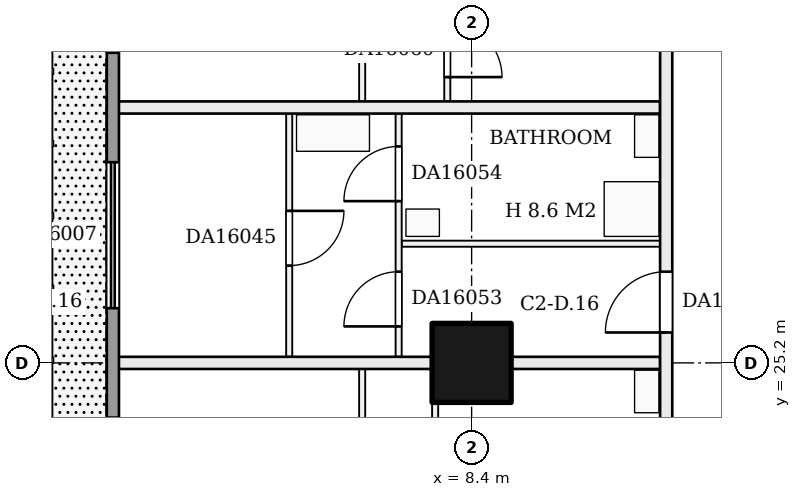
"""IFC4 building model, lengths in metres.
Left out: names, types, materials, properties, quantities, classifications, styles, units other than length and angle.
Written with IfcOpenShell. Run it as: python <this file> out.ifc"""

import sys

from ifc_helpers import new_model, si_unit, direction, frame, frame_2d, origin, origin_2d, place, context, subcontext, project, spatial, rectangle, extrude, element, fill, save


model = new_model("IFC4")
c1 = context("Model", 3, precision=1e-05, world=origin(), true_north=direction((0.0, 1.0)))
c2 = subcontext(c1, "Body", "Model", "MODEL_VIEW")
j1 = project(units=[si_unit("LENGTHUNIT", "METRE"), si_unit("PLANEANGLEUNIT", "RADIAN")], contexts=[c1])
p1 = place(None, origin())
s1 = spatial("IfcSite", under=j1, at=p1, CompositionType="ELEMENT")
p2 = place(p1, origin())
s2 = spatial("IfcBuilding", under=s1, at=p2, CompositionType="ELEMENT")
p3 = place(p2, frame((0.0, 0.0, 67.2)))
s3 = spatial("IfcBuildingStorey", under=s2, at=p3, CompositionType="ELEMENT", Elevation=67.2)
p4 = place(p3, frame((8.4, 25.2, 0.0), z_axis=(0.0, 0.0, 1.0), x_axis=(1.0, 0.0, 0.0)))
e1 = element("IfcColumn", 1, at=p4, inside=s3, PredefinedType="COLUMN", context=c2, shape_type="SweptSolid", body=[
    extrude(rectangle(XDim=1.3, YDim=1.3, at=origin_2d()), origin(), (0.0, 0.0, 1.0), 3.22),
])
p5 = place(p3, frame((2.5, 25.2, 0.0), z_axis=(0.0, 0.0, 1.0), x_axis=(1.0, 0.0, 0.0)))
e2 = element("IfcWall", 2, at=p5, inside=s3, PredefinedType="PARTITIONING", context=c2, shape_type="SweptSolid", body=[
    extrude(rectangle(XDim=9.0, YDim=0.2, at=frame_2d((4.5, 0.0))), origin(), (0.0, 0.0, 1.0), 3.22),
])
p6 = place(p3, frame((7.25, 27.16, 0.0), z_axis=(0.0, 0.0, 1.0), x_axis=(1.0, 0.0, 0.0)))
e3 = element("IfcWall", 3, at=p6, inside=s3, PredefinedType="PARTITIONING", context=c2, shape_type="SweptSolid", body=[
    extrude(rectangle(XDim=4.25, YDim=0.1, at=frame_2d((2.125, 0.0))), origin(), (0.0, 0.0, 1.0), 3.22),
])
p7 = place(p3, frame((2.5, 29.4, 0.0), z_axis=(0.0, 0.0, 1.0), x_axis=(1.0, 0.0, 0.0)))
e4 = element("IfcWall", 4, at=p7, inside=s3, PredefinedType="PARTITIONING", context=c2, shape_type="SweptSolid", body=[
    extrude(rectangle(XDim=9.0, YDim=0.2, at=frame_2d((4.5, 0.0))), origin(), (0.0, 0.0, 1.0), 3.22),
])
p8 = place(p3, frame((5.4, 25.3, 0.0), z_axis=(0.0, 0.0, 1.0), x_axis=(0.0, 1.0, 0.0)))
e5 = element("IfcWall", 5, at=p8, inside=s3, PredefinedType="PARTITIONING", context=c2, shape_type="SweptSolid", body=[
    extrude(rectangle(XDim=4.0, YDim=0.1, at=frame_2d((2.0, 0.0))), origin(), (0.0, 0.0, 1.0), 3.22),
])
p9 = place(p8, frame((1.5, 0.0, 0.0)))
e6 = element("IfcOpeningElement", 6, at=p9, cuts=e5, PredefinedType="OPENING", context=c2, shape_type="SweptSolid", body=[
    extrude(rectangle(XDim=0.9, YDim=2.1, at=frame_2d((0.45, 1.05))), frame((0.0, 0.06, 0.0), z_axis=(0.0, -1.0, 0.0), x_axis=(1.0, 0.0, 0.0)), (0.0, 0.0, 1.0), 0.12),
])
p10 = place(p3, frame((6.6, 12.7, 0.0), z_axis=(0.0, 0.0, 1.0), x_axis=(0.0, 1.0, 0.0)))
e7 = element("IfcWall", 7, at=p10, inside=s3, PredefinedType="PARTITIONING", context=c2, shape_type="SweptSolid", body=[
    extrude(rectangle(XDim=12.4, YDim=0.1, at=frame_2d((6.2, 0.0))), origin(), (0.0, 0.0, 1.0), 3.22),
])
p11 = place(p10, frame((1.6, 0.0, 0.0)))
e8 = element("IfcOpeningElement", 8, at=p11, cuts=e7, PredefinedType="OPENING", context=c2, shape_type="SweptSolid", body=[
    extrude(rectangle(XDim=0.9, YDim=2.1, at=frame_2d((0.45, 1.05))), frame((0.0, 0.06, 0.0), z_axis=(0.0, -1.0, 0.0), x_axis=(1.0, 0.0, 0.0)), (0.0, 0.0, 1.0), 0.12),
])
p12 = place(p10, frame((7.8, 0.0, 0.0)))
e9 = element("IfcOpeningElement", 9, at=p12, cuts=e7, PredefinedType="OPENING", context=c2, shape_type="SweptSolid", body=[
    extrude(rectangle(XDim=0.9, YDim=2.1, at=frame_2d((0.45, 1.05))), frame((0.0, 0.06, 0.0), z_axis=(0.0, -1.0, 0.0), x_axis=(1.0, 0.0, 0.0)), (0.0, 0.0, 1.0), 0.12),
])
p13 = place(p3, frame((6.6, 29.5, 0.0), z_axis=(0.0, 0.0, 1.0), x_axis=(0.0, 1.0, 0.0)))
e10 = element("IfcWall", 10, at=p13, inside=s3, PredefinedType="PARTITIONING", context=c2, shape_type="SweptSolid", body=[
    extrude(rectangle(XDim=12.4, YDim=0.1, at=frame_2d((6.2, 0.0))), origin(), (0.0, 0.0, 1.0), 3.22),
])
p14 = place(p13, frame((1.5, 0.0, 0.0)))
e11 = element("IfcOpeningElement", 11, at=p14, cuts=e10, PredefinedType="OPENING", context=c2, shape_type="SweptSolid", body=[
    extrude(rectangle(XDim=0.9, YDim=2.1, at=frame_2d((0.45, 1.05))), frame((0.0, 0.06, 0.0), z_axis=(0.0, -1.0, 0.0), x_axis=(1.0, 0.0, 0.0)), (0.0, 0.0, 1.0), 0.12),
])
p15 = place(p13, frame((5.7, 0.0, 0.0)))
e12 = element("IfcOpeningElement", 12, at=p15, cuts=e10, PredefinedType="OPENING", context=c2, shape_type="SweptSolid", body=[
    extrude(rectangle(XDim=0.9, YDim=2.1, at=frame_2d((0.45, 1.05))), frame((0.0, 0.06, 0.0), z_axis=(0.0, -1.0, 0.0), x_axis=(1.0, 0.0, 0.0)), (0.0, 0.0, 1.0), 0.12),
])
p16 = place(p13, frame((9.9, 0.0, 0.0)))
e13 = element("IfcOpeningElement", 13, at=p16, cuts=e10, PredefinedType="OPENING", context=c2, shape_type="SweptSolid", body=[
    extrude(rectangle(XDim=0.9, YDim=2.1, at=frame_2d((0.45, 1.05))), frame((0.0, 0.06, 0.0), z_axis=(0.0, -1.0, 0.0), x_axis=(1.0, 0.0, 0.0)), (0.0, 0.0, 1.0), 0.12),
])
p17 = place(p3, frame((7.2, 25.3, 0.0), z_axis=(0.0, 0.0, 1.0), x_axis=(0.0, 1.0, 0.0)))
e14 = element("IfcWall", 14, at=p17, inside=s3, PredefinedType="PARTITIONING", context=c2, shape_type="SweptSolid", body=[
    extrude(rectangle(XDim=4.0, YDim=0.1, at=frame_2d((2.0, 0.0))), origin(), (0.0, 0.0, 1.0), 3.22),
])
p18 = place(p17, frame((0.5, 0.0, 0.0)))
e15 = element("IfcOpeningElement", 15, at=p18, cuts=e14, PredefinedType="OPENING", context=c2, shape_type="SweptSolid", body=[
    extrude(rectangle(XDim=0.9, YDim=2.1, at=frame_2d((0.45, 1.05))), frame((0.0, 0.06, 0.0), z_axis=(0.0, -1.0, 0.0), x_axis=(1.0, 0.0, 0.0)), (0.0, 0.0, 1.0), 0.12),
])
p19 = place(p17, frame((2.56, 0.0, 0.0)))
e16 = element("IfcOpeningElement", 16, at=p19, cuts=e14, PredefinedType="OPENING", context=c2, shape_type="SweptSolid", body=[
    extrude(rectangle(XDim=0.9, YDim=2.1, at=frame_2d((0.45, 1.05))), frame((0.0, 0.06, 0.0), z_axis=(0.0, -1.0, 0.0), x_axis=(1.0, 0.0, 0.0)), (0.0, 0.0, 1.0), 0.12),
])
p20 = place(p3, frame((7.8, 12.7, 0.0), z_axis=(0.0, 0.0, 1.0), x_axis=(0.0, 1.0, 0.0)))
e17 = element("IfcWall", 17, at=p20, inside=s3, PredefinedType="PARTITIONING", context=c2, shape_type="SweptSolid", body=[
    extrude(rectangle(XDim=12.4, YDim=0.1, at=frame_2d((6.2, 0.0))), origin(), (0.0, 0.0, 1.0), 3.22),
])
p21 = place(p20, frame((7.0, 0.0, 0.0)))
e18 = element("IfcOpeningElement", 18, at=p21, cuts=e17, PredefinedType="OPENING", context=c2, shape_type="SweptSolid", body=[
    extrude(rectangle(XDim=0.9, YDim=2.1, at=frame_2d((0.45, 1.05))), frame((0.0, 0.06, 0.0), z_axis=(0.0, -1.0, 0.0), x_axis=(1.0, 0.0, 0.0)), (0.0, 0.0, 1.0), 0.12),
])
p22 = place(p20, frame((0.4, 0.0, 0.0)))
e19 = element("IfcOpeningElement", 19, at=p22, cuts=e17, PredefinedType="OPENING", context=c2, shape_type="SweptSolid", body=[
    extrude(rectangle(XDim=0.9, YDim=2.1, at=frame_2d((0.45, 1.05))), frame((0.0, 0.06, 0.0), z_axis=(0.0, -1.0, 0.0), x_axis=(1.0, 0.0, 0.0)), (0.0, 0.0, 1.0), 0.12),
])
p23 = place(p20, frame((2.35, 0.0, 0.0)))
e20 = element("IfcOpeningElement", 20, at=p23, cuts=e17, PredefinedType="OPENING", context=c2, shape_type="SweptSolid", body=[
    extrude(rectangle(XDim=0.9, YDim=2.1, at=frame_2d((0.45, 1.05))), frame((0.0, 0.06, 0.0), z_axis=(0.0, -1.0, 0.0), x_axis=(1.0, 0.0, 0.0)), (0.0, 0.0, 1.0), 0.12),
])
p24 = place(p20, frame((10.35, 0.0, 0.0)))
e21 = element("IfcOpeningElement", 21, at=p24, cuts=e17, PredefinedType="OPENING", context=c2, shape_type="SweptSolid", body=[
    extrude(rectangle(XDim=0.9, YDim=2.1, at=frame_2d((0.45, 1.05))), frame((0.0, 0.06, 0.0), z_axis=(0.0, -1.0, 0.0), x_axis=(1.0, 0.0, 0.0)), (0.0, 0.0, 1.0), 0.12),
])
p25 = place(p3, frame((8.0, 29.5, 0.0), z_axis=(0.0, 0.0, 1.0), x_axis=(0.0, 1.0, 0.0)))
e22 = element("IfcWall", 22, at=p25, inside=s3, PredefinedType="PARTITIONING", context=c2, shape_type="SweptSolid", body=[
    extrude(rectangle(XDim=12.4, YDim=0.1, at=frame_2d((6.2, 0.0))), origin(), (0.0, 0.0, 1.0), 3.22),
])
p26 = place(p25, frame((5.12, 0.0, 0.0)))
e23 = element("IfcOpeningElement", 23, at=p26, cuts=e22, PredefinedType="OPENING", context=c2, shape_type="SweptSolid", body=[
    extrude(rectangle(XDim=0.9, YDim=2.1, at=frame_2d((0.45, 1.05))), frame((0.0, 0.06, 0.0), z_axis=(0.0, -1.0, 0.0), x_axis=(1.0, 0.0, 0.0)), (0.0, 0.0, 1.0), 0.12),
])
p27 = place(p25, frame((0.4, 0.0, 0.0)))
e24 = element("IfcOpeningElement", 24, at=p27, cuts=e22, PredefinedType="OPENING", context=c2, shape_type="SweptSolid", body=[
    extrude(rectangle(XDim=0.9, YDim=2.1, at=frame_2d((0.45, 1.05))), frame((0.0, 0.06, 0.0), z_axis=(0.0, -1.0, 0.0), x_axis=(1.0, 0.0, 0.0)), (0.0, 0.0, 1.0), 0.12),
])
p28 = place(p25, frame((2.36, 0.0, 0.0)))
e25 = element("IfcOpeningElement", 25, at=p28, cuts=e22, PredefinedType="OPENING", context=c2, shape_type="SweptSolid", body=[
    extrude(rectangle(XDim=0.9, YDim=2.1, at=frame_2d((0.45, 1.05))), frame((0.0, 0.06, 0.0), z_axis=(0.0, -1.0, 0.0), x_axis=(1.0, 0.0, 0.0)), (0.0, 0.0, 1.0), 0.12),
])
p29 = place(p25, frame((7.58, 0.0, 0.0)))
e26 = element("IfcOpeningElement", 26, at=p29, cuts=e22, PredefinedType="OPENING", context=c2, shape_type="SweptSolid", body=[
    extrude(rectangle(XDim=0.9, YDim=2.1, at=frame_2d((0.45, 1.05))), frame((0.0, 0.06, 0.0), z_axis=(0.0, -1.0, 0.0), x_axis=(1.0, 0.0, 0.0)), (0.0, 0.0, 1.0), 0.12),
])
p30 = place(p25, frame((10.44, 0.0, 0.0)))
e27 = element("IfcOpeningElement", 27, at=p30, cuts=e22, PredefinedType="OPENING", context=c2, shape_type="SweptSolid", body=[
    extrude(rectangle(XDim=0.9, YDim=2.1, at=frame_2d((0.45, 1.05))), frame((0.0, 0.06, 0.0), z_axis=(0.0, -1.0, 0.0), x_axis=(1.0, 0.0, 0.0)), (0.0, 0.0, 1.0), 0.12),
])
p31 = place(p3, frame((11.6, 11.7, 0.0), z_axis=(0.0, 0.0, 1.0), x_axis=(0.0, 1.0, 0.0)))
e28 = element("IfcWall", 28, at=p31, inside=s3, PredefinedType="PARTITIONING", context=c2, shape_type="SweptSolid", body=[
    extrude(rectangle(XDim=30.3, YDim=0.2, at=frame_2d((15.15, 0.0))), origin(), (0.0, 0.0, 1.0), 3.22),
])
p32 = place(p31, frame((7.9, 0.0, 0.0)))
e29 = element("IfcOpeningElement", 29, at=p32, cuts=e28, PredefinedType="OPENING", context=c2, shape_type="SweptSolid", body=[
    extrude(rectangle(XDim=1.0, YDim=2.1, at=frame_2d((0.5, 1.05))), frame((0.0, 0.11, 0.0), z_axis=(0.0, -1.0, 0.0), x_axis=(1.0, 0.0, 0.0)), (0.0, 0.0, 1.0), 0.22),
])
p33 = place(p31, frame((14.0, 0.0, 0.0)))
e30 = element("IfcOpeningElement", 30, at=p33, cuts=e28, PredefinedType="OPENING", context=c2, shape_type="SweptSolid", body=[
    extrude(rectangle(XDim=1.0, YDim=2.1, at=frame_2d((0.5, 1.05))), frame((0.0, 0.11, 0.0), z_axis=(0.0, -1.0, 0.0), x_axis=(1.0, 0.0, 0.0)), (0.0, 0.0, 1.0), 0.22),
])
p34 = place(p31, frame((22.92, 0.0, 0.0)))
e31 = element("IfcOpeningElement", 31, at=p34, cuts=e28, PredefinedType="OPENING", context=c2, shape_type="SweptSolid", body=[
    extrude(rectangle(XDim=1.0, YDim=2.1, at=frame_2d((0.5, 1.05))), frame((0.0, 0.11, 0.0), z_axis=(0.0, -1.0, 0.0), x_axis=(1.0, 0.0, 0.0)), (0.0, 0.0, 1.0), 0.22),
])
p35 = place(p3, frame((2.5, 53.8, 0.0), z_axis=(0.0, 0.0, 1.0), x_axis=(0.0, -1.0, 0.0)))
e32 = element("IfcWall", 32, at=p35, inside=s3, PredefinedType="SOLIDWALL", context=c2, shape_type="SweptSolid", body=[
    extrude(rectangle(XDim=48.8, YDim=0.2, at=frame_2d((24.4, 0.0))), origin(), (0.0, 0.0, 1.0), 3.22),
])
p36 = place(p35, frame((46.1, 0.0, 0.0)))
e33 = element("IfcOpeningElement", 33, at=p36, cuts=e32, PredefinedType="OPENING", context=c2, shape_type="SweptSolid", body=[
    extrude(rectangle(XDim=2.4, YDim=2.2, at=frame_2d((1.2, 1.1))), frame((0.0, 0.11, 0.0), z_axis=(0.0, -1.0, 0.0), x_axis=(1.0, 0.0, 0.0)), (0.0, 0.0, 1.0), 0.22),
])
p37 = place(p35, frame((42.1, 0.0, 0.0)))
e34 = element("IfcOpeningElement", 34, at=p37, cuts=e32, PredefinedType="OPENING", context=c2, shape_type="SweptSolid", body=[
    extrude(rectangle(XDim=2.4, YDim=2.2, at=frame_2d((1.2, 1.1))), frame((0.0, 0.11, 0.0), z_axis=(0.0, -1.0, 0.0), x_axis=(1.0, 0.0, 0.0)), (0.0, 0.0, 1.0), 0.22),
])
p38 = place(p35, frame((37.9, 0.0, 0.9)))
e35 = element("IfcOpeningElement", 35, at=p38, cuts=e32, PredefinedType="OPENING", context=c2, shape_type="SweptSolid", body=[
    extrude(rectangle(XDim=2.4, YDim=1.5, at=frame_2d((1.2, 0.75))), frame((0.0, 0.11, 0.0), z_axis=(0.0, -1.0, 0.0), x_axis=(1.0, 0.0, 0.0)), (0.0, 0.0, 1.0), 0.22),
])
p39 = place(p35, frame((33.7, 0.0, 0.0)))
e36 = element("IfcOpeningElement", 36, at=p39, cuts=e32, PredefinedType="OPENING", context=c2, shape_type="SweptSolid", body=[
    extrude(rectangle(XDim=2.4, YDim=2.2, at=frame_2d((1.2, 1.1))), frame((0.0, 0.11, 0.0), z_axis=(0.0, -1.0, 0.0), x_axis=(1.0, 0.0, 0.0)), (0.0, 0.0, 1.0), 0.22),
])
p40 = place(p35, frame((29.5, 0.0, 0.0)))
e37 = element("IfcOpeningElement", 37, at=p40, cuts=e32, PredefinedType="OPENING", context=c2, shape_type="SweptSolid", body=[
    extrude(rectangle(XDim=2.4, YDim=2.2, at=frame_2d((1.2, 1.1))), frame((0.0, 0.11, 0.0), z_axis=(0.0, -1.0, 0.0), x_axis=(1.0, 0.0, 0.0)), (0.0, 0.0, 1.0), 0.22),
])
p41 = place(p35, frame((25.3, 0.0, 0.0)))
e38 = element("IfcOpeningElement", 38, at=p41, cuts=e32, PredefinedType="OPENING", context=c2, shape_type="SweptSolid", body=[
    extrude(rectangle(XDim=2.4, YDim=2.2, at=frame_2d((1.2, 1.1))), frame((0.0, 0.11, 0.0), z_axis=(0.0, -1.0, 0.0), x_axis=(1.0, 0.0, 0.0)), (0.0, 0.0, 1.0), 0.22),
])
p42 = place(p35, frame((21.1, 0.0, 0.9)))
e39 = element("IfcOpeningElement", 39, at=p42, cuts=e32, PredefinedType="OPENING", context=c2, shape_type="SweptSolid", body=[
    extrude(rectangle(XDim=2.4, YDim=1.5, at=frame_2d((1.2, 0.75))), frame((0.0, 0.11, 0.0), z_axis=(0.0, -1.0, 0.0), x_axis=(1.0, 0.0, 0.0)), (0.0, 0.0, 1.0), 0.22),
])
p43 = place(p35, frame((16.9, 0.0, 0.0)))
e40 = element("IfcOpeningElement", 40, at=p43, cuts=e32, PredefinedType="OPENING", context=c2, shape_type="SweptSolid", body=[
    extrude(rectangle(XDim=2.4, YDim=2.2, at=frame_2d((1.2, 1.1))), frame((0.0, 0.11, 0.0), z_axis=(0.0, -1.0, 0.0), x_axis=(1.0, 0.0, 0.0)), (0.0, 0.0, 1.0), 0.22),
])
p44 = place(p35, frame((12.7, 0.0, 0.9)))
e41 = element("IfcOpeningElement", 41, at=p44, cuts=e32, PredefinedType="OPENING", context=c2, shape_type="SweptSolid", body=[
    extrude(rectangle(XDim=2.4, YDim=1.5, at=frame_2d((1.2, 0.75))), frame((0.0, 0.11, 0.0), z_axis=(0.0, -1.0, 0.0), x_axis=(1.0, 0.0, 0.0)), (0.0, 0.0, 1.0), 0.22),
])
p45 = place(p35, frame((8.5, 0.0, 0.9)))
e42 = element("IfcOpeningElement", 42, at=p45, cuts=e32, PredefinedType="OPENING", context=c2, shape_type="SweptSolid", body=[
    extrude(rectangle(XDim=2.4, YDim=1.5, at=frame_2d((1.2, 0.75))), frame((0.0, 0.11, 0.0), z_axis=(0.0, -1.0, 0.0), x_axis=(1.0, 0.0, 0.0)), (0.0, 0.0, 1.0), 0.22),
])
p46 = place(p35, frame((4.3, 0.0, 0.0)))
e43 = element("IfcOpeningElement", 43, at=p46, cuts=e32, PredefinedType="OPENING", context=c2, shape_type="SweptSolid", body=[
    extrude(rectangle(XDim=2.4, YDim=2.2, at=frame_2d((1.2, 1.1))), frame((0.0, 0.11, 0.0), z_axis=(0.0, -1.0, 0.0), x_axis=(1.0, 0.0, 0.0)), (0.0, 0.0, 1.0), 0.22),
])
p47 = place(p35, frame((0.3, 0.0, 0.9)))
e44 = element("IfcOpeningElement", 44, at=p47, cuts=e32, PredefinedType="OPENING", context=c2, shape_type="SweptSolid", body=[
    extrude(rectangle(XDim=2.4, YDim=1.5, at=frame_2d((1.2, 0.75))), frame((0.0, 0.11, 0.0), z_axis=(0.0, -1.0, 0.0), x_axis=(1.0, 0.0, 0.0)), (0.0, 0.0, 1.0), 0.22),
])
p48 = place(p9, frame((0.9, 0.0, 0.0), z_axis=(0.0, 0.0, 1.0), x_axis=(-1.0, 0.0, 0.0)))
e45 = element("IfcDoor", 45, at=p48, inside=s3, OperationType="SINGLE_SWING_LEFT", PredefinedType="DOOR", context=c2, shape_type="SweptSolid", body=[
    extrude(rectangle(XDim=0.9, YDim=2.1, at=frame_2d((0.45, 1.05))), frame((0.0, 0.025, 0.0), z_axis=(0.0, -1.0, 0.0), x_axis=(1.0, 0.0, 0.0)), (0.0, 0.0, 1.0), 0.05),
])
fill(e6, e45)
p49 = place(p18, origin())
e46 = element("IfcDoor", 46, at=p49, inside=s3, OperationType="SINGLE_SWING_LEFT", PredefinedType="DOOR", context=c2, shape_type="SweptSolid", body=[
    extrude(rectangle(XDim=0.9, YDim=2.1, at=frame_2d((0.45, 1.05))), frame((0.0, 0.025, 0.0), z_axis=(0.0, -1.0, 0.0), x_axis=(1.0, 0.0, 0.0)), (0.0, 0.0, 1.0), 0.05),
])
fill(e15, e46)
p50 = place(p19, origin())
e47 = element("IfcDoor", 47, at=p50, inside=s3, OperationType="SINGLE_SWING_LEFT", PredefinedType="DOOR", context=c2, shape_type="SweptSolid", body=[
    extrude(rectangle(XDim=0.9, YDim=2.1, at=frame_2d((0.45, 1.05))), frame((0.0, 0.025, 0.0), z_axis=(0.0, -1.0, 0.0), x_axis=(1.0, 0.0, 0.0)), (0.0, 0.0, 1.0), 0.05),
])
fill(e16, e47)
p51 = place(p27, frame((0.9, 0.0, 0.0), z_axis=(0.0, 0.0, 1.0), x_axis=(-1.0, 0.0, 0.0)))
e48 = element("IfcDoor", 48, at=p51, inside=s3, OperationType="SINGLE_SWING_RIGHT", PredefinedType="DOOR", context=c2, shape_type="SweptSolid", body=[
    extrude(rectangle(XDim=0.9, YDim=2.1, at=frame_2d((0.45, 1.05))), frame((0.0, 0.025, 0.0), z_axis=(0.0, -1.0, 0.0), x_axis=(1.0, 0.0, 0.0)), (0.0, 0.0, 1.0), 0.05),
])
fill(e24, e48)
p52 = place(p33, origin())
e49 = element("IfcDoor", 49, at=p52, inside=s3, OperationType="SINGLE_SWING_LEFT", PredefinedType="DOOR", context=c2, shape_type="SweptSolid", body=[
    extrude(rectangle(XDim=1.0, YDim=2.1, at=frame_2d((0.5, 1.05))), frame((0.0, 0.025, 0.0), z_axis=(0.0, -1.0, 0.0), x_axis=(1.0, 0.0, 0.0)), (0.0, 0.0, 1.0), 0.05),
])
fill(e30, e49)
p53 = place(p41, origin())
e50 = element("IfcDoor", 50, at=p53, inside=s3, OperationType="DOUBLE_DOOR_SLIDING", PredefinedType="DOOR", context=c2, shape_type="SweptSolid", body=[
    extrude(rectangle(XDim=2.4, YDim=2.2, at=frame_2d((1.2, 1.1))), frame((0.0, 0.025, 0.0), z_axis=(0.0, -1.0, 0.0), x_axis=(1.0, 0.0, 0.0)), (0.0, 0.0, 1.0), 0.05),
])
fill(e38, e50)
save(model, sys.argv[1])
